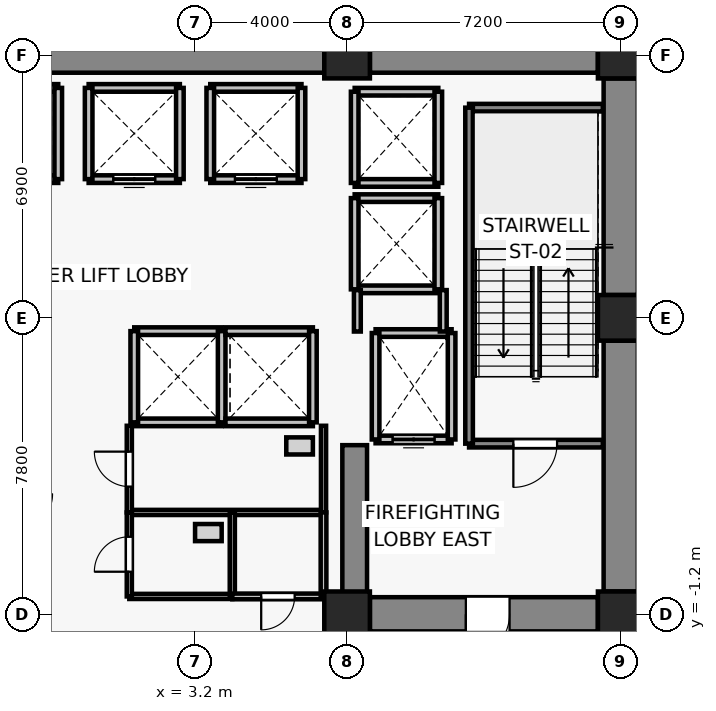
"""IFC4 building model, lengths in metres.
Left out: names, types, materials, properties, quantities, classifications, styles, units other than length and angle.
Written with IfcOpenShell. Run it as: python <this file> out.ifc"""

import sys

from ifc_helpers import new_model, si_unit, direction, frame, frame_2d, origin, origin_2d, place, context, subcontext, project, spatial, rectangle, extrude, source, transform, mapped, element, fill, save


model = new_model("IFC4")
c1 = context("Model", 3, precision=1e-05, world=origin(), true_north=direction((0.0, 1.0)))
c2 = subcontext(c1, "Body", "Model", "MODEL_VIEW")
j1 = project(units=[si_unit("LENGTHUNIT", "METRE"), si_unit("PLANEANGLEUNIT", "RADIAN")], contexts=[c1])
p1 = place(None, origin())
s1 = spatial("IfcSite", under=j1, at=p1, CompositionType="ELEMENT")
p2 = place(p1, origin())
s2 = spatial("IfcBuilding", under=s1, at=p2, CompositionType="ELEMENT")
p3 = place(p2, frame((0.0, 0.0, 9.4)))
s3 = spatial("IfcBuildingStorey", under=s2, at=p3, CompositionType="ELEMENT", Elevation=9.4)
for number, where, z_axis, x_axis in (
    (1, (7.2, -1.2, 0.0), (0.0, 0.0, 1.0), (1.0, 0.0, 0.0)),
    (2, (14.4, -1.2, 0.0), (0.0, 0.0, 1.0), (1.0, 0.0, 0.0)),
    (3, (14.4, 6.6, 0.0), (0.0, 0.0, 1.0), (1.0, 0.0, 0.0)),
    (4, (7.2, 13.5, 0.0), (0.0, 0.0, 1.0), (1.0, 0.0, 0.0)),
    (5, (14.4, 13.5, 0.0), (0.0, 0.0, 1.0), (1.0, 0.0, 0.0)),
):
    element("IfcColumn", number, at=place(p3, frame(where, z_axis=z_axis, x_axis=x_axis)), inside=s3, PredefinedType="COLUMN", context=c2, shape_type="SweptSolid", body=[
        extrude(rectangle(XDim=1.2, YDim=1.2, at=origin_2d()), origin(), (0.0, 0.0, 1.0), 4.4),
    ])
p4 = place(p3, frame((-6.6, 13.5, 0.0), z_axis=(0.0, 0.0, 1.0), x_axis=(1.0, 0.0, 0.0)))
e6 = element("IfcWall", 6, at=p4, inside=s3, PredefinedType="SHEAR", context=c2, shape_type="SweptSolid", body=[
    extrude(rectangle(XDim=13.2, YDim=0.9, at=frame_2d((6.6, 0.0))), origin(), (0.0, 0.0, 1.0), 4.1),
])
p5 = place(p3, frame((7.8, 13.5, 0.0), z_axis=(0.0, 0.0, 1.0), x_axis=(1.0, 0.0, 0.0)))
e7 = element("IfcWall", 7, at=p5, inside=s3, PredefinedType="SHEAR", context=c2, shape_type="SweptSolid", body=[
    extrude(rectangle(XDim=6.0, YDim=0.9, at=frame_2d((3.0, 0.0))), origin(), (0.0, 0.0, 1.0), 4.1),
])
p6 = place(p3, frame((14.4, -0.6, 0.0), z_axis=(0.0, 0.0, 1.0), x_axis=(0.0, 1.0, 0.0)))
e8 = element("IfcWall", 8, at=p6, inside=s3, PredefinedType="SHEAR", context=c2, shape_type="SweptSolid", body=[
    extrude(rectangle(XDim=6.6, YDim=0.9, at=frame_2d((3.3, 0.0))), origin(), (0.0, 0.0, 1.0), 4.1),
])
p7 = place(p3, frame((14.4, 7.2, 0.0), z_axis=(0.0, 0.0, 1.0), x_axis=(0.0, 1.0, 0.0)))
e9 = element("IfcWall", 9, at=p7, inside=s3, PredefinedType="SHEAR", context=c2, shape_type="SweptSolid", body=[
    extrude(rectangle(XDim=5.7, YDim=0.9, at=frame_2d((2.85, 0.0))), origin(), (0.0, 0.0, 1.0), 4.1),
])
p8 = place(p3, frame((13.8, -1.2, 0.0), z_axis=(0.0, 0.0, 1.0), x_axis=(-1.0, 0.0, 0.0)))
e10 = element("IfcWall", 10, at=p8, inside=s3, PredefinedType="SHEAR", context=c2, shape_type="SweptSolid", body=[
    extrude(rectangle(XDim=6.0, YDim=0.9, at=frame_2d((3.0, 0.0))), origin(), (0.0, 0.0, 1.0), 4.1),
])
p9 = place(p8, frame((2.325, 0.0, 0.0)))
e11 = element("IfcOpeningElement", 11, at=p9, cuts=e10, PredefinedType="OPENING", context=c2, shape_type="SweptSolid", body=[
    extrude(rectangle(XDim=1.15, YDim=2.15, at=frame_2d((0.575, 1.075))), frame((0.0, 0.46, 0.0), z_axis=(0.0, -1.0, 0.0), x_axis=(1.0, 0.0, 0.0)), (0.0, 0.0, 1.0), 0.92),
])
p10 = place(p3, frame((7.4, -0.75, 0.0), z_axis=(0.0, 0.0, 1.0), x_axis=(0.0, 1.0, 0.0)))
e12 = element("IfcWall", 12, at=p10, inside=s3, PredefinedType="SHEAR", context=c2, shape_type="SweptSolid", body=[
    extrude(rectangle(XDim=4.0, YDim=0.65, at=frame_2d((2.0, 0.0))), origin(), (0.0, 0.0, 1.0), 4.1),
])
p11 = place(p3, frame((9.95, 3.4, 0.0), z_axis=(0.0, 0.0, 1.0), x_axis=(-1.0, 0.0, 0.0)))
e13 = element("IfcWall", 13, at=p11, inside=s3, PredefinedType="SOLIDWALL", context=c2, shape_type="SweptSolid", body=[
    extrude(rectangle(XDim=2.0, YDim=0.2, at=frame_2d((1.0, 0.0))), origin(), (0.0, 0.0, 1.0), 4.1),
])
p12 = place(p11, frame((0.45, 0.0, 0.0)))
e14 = element("IfcOpeningElement", 14, at=p12, cuts=e13, PredefinedType="OPENING", context=c2, shape_type="SweptSolid", body=[
    extrude(rectangle(XDim=1.1, YDim=2.2, at=frame_2d((0.55, 1.1))), frame((0.0, 0.11, 0.0), z_axis=(0.0, -1.0, 0.0), x_axis=(1.0, 0.0, 0.0)), (0.0, 0.0, 1.0), 0.22),
])
p13 = place(p3, frame((7.95, 6.2, 0.0), z_axis=(0.0, 0.0, 1.0), x_axis=(1.0, 0.0, 0.0)))
e15 = element("IfcWall", 15, at=p13, inside=s3, PredefinedType="SOLIDWALL", context=c2, shape_type="SweptSolid", body=[
    extrude(rectangle(XDim=2.0, YDim=0.2, at=frame_2d((1.0, 0.0))), origin(), (0.0, 0.0, 1.0), 4.1),
])
for number, where, z_axis, x_axis in (
    (16, (7.95, 3.4, 0.0), (0.0, 0.0, 1.0), (0.0, 1.0, 0.0)),
    (17, (9.95, 6.2, 0.0), (0.0, 0.0, 1.0), (0.0, -1.0, 0.0)),
):
    element("IfcWall", number, at=place(p3, frame(where, z_axis=z_axis, x_axis=x_axis)), inside=s3, PredefinedType="SOLIDWALL", context=c2, shape_type="SweptSolid", body=[
        extrude(rectangle(XDim=2.8, YDim=0.2, at=frame_2d((1.4, 0.0))), origin(), (0.0, 0.0, 1.0), 4.1),
    ])
p14 = place(p3, frame((-0.4, 10.25, 0.0), z_axis=(0.0, 0.0, 1.0), x_axis=(-1.0, 0.0, 0.0)))
e18 = element("IfcWall", 18, at=p14, inside=s3, PredefinedType="SOLIDWALL", context=c2, shape_type="SweptSolid", body=[
    extrude(rectangle(XDim=2.4, YDim=0.2, at=frame_2d((1.2, 0.0))), origin(), (0.0, 0.0, 1.0), 4.1),
])
p15 = place(p14, frame((0.65, 0.0, 0.0)))
e19 = element("IfcOpeningElement", 19, at=p15, cuts=e18, PredefinedType="OPENING", context=c2, shape_type="SweptSolid", body=[
    extrude(rectangle(XDim=1.1, YDim=2.2, at=frame_2d((0.55, 1.1))), frame((0.0, 0.11, 0.0), z_axis=(0.0, -1.0, 0.0), x_axis=(1.0, 0.0, 0.0)), (0.0, 0.0, 1.0), 0.22),
])
p16 = place(p3, frame((-2.8, 12.65, 0.0), z_axis=(0.0, 0.0, 1.0), x_axis=(1.0, 0.0, 0.0)))
e20 = element("IfcWall", 20, at=p16, inside=s3, PredefinedType="SOLIDWALL", context=c2, shape_type="SweptSolid", body=[
    extrude(rectangle(XDim=2.4, YDim=0.2, at=frame_2d((1.2, 0.0))), origin(), (0.0, 0.0, 1.0), 4.1),
])
p17 = place(p3, frame((-0.4, 12.65, 0.0), z_axis=(0.0, 0.0, 1.0), x_axis=(0.0, -1.0, 0.0)))
e21 = element("IfcWall", 21, at=p17, inside=s3, PredefinedType="SOLIDWALL", context=c2, shape_type="SweptSolid", body=[
    extrude(rectangle(XDim=2.4, YDim=0.2, at=frame_2d((1.2, 0.0))), origin(), (0.0, 0.0, 1.0), 4.1),
])
p18 = place(p3, frame((2.8, 10.25, 0.0), z_axis=(0.0, 0.0, 1.0), x_axis=(-1.0, 0.0, 0.0)))
e22 = element("IfcWall", 22, at=p18, inside=s3, PredefinedType="SOLIDWALL", context=c2, shape_type="SweptSolid", body=[
    extrude(rectangle(XDim=2.4, YDim=0.2, at=frame_2d((1.2, 0.0))), origin(), (0.0, 0.0, 1.0), 4.1),
])
p19 = place(p18, frame((0.65, 0.0, 0.0)))
e23 = element("IfcOpeningElement", 23, at=p19, cuts=e22, PredefinedType="OPENING", context=c2, shape_type="SweptSolid", body=[
    extrude(rectangle(XDim=1.1, YDim=2.2, at=frame_2d((0.55, 1.1))), frame((0.0, 0.11, 0.0), z_axis=(0.0, -1.0, 0.0), x_axis=(1.0, 0.0, 0.0)), (0.0, 0.0, 1.0), 0.22),
])
p20 = place(p3, frame((0.4, 12.65, 0.0), z_axis=(0.0, 0.0, 1.0), x_axis=(1.0, 0.0, 0.0)))
e24 = element("IfcWall", 24, at=p20, inside=s3, PredefinedType="SOLIDWALL", context=c2, shape_type="SweptSolid", body=[
    extrude(rectangle(XDim=2.4, YDim=0.2, at=frame_2d((1.2, 0.0))), origin(), (0.0, 0.0, 1.0), 4.1),
])
for number, where, z_axis, x_axis in (
    (25, (0.4, 10.25, 0.0), (0.0, 0.0, 1.0), (0.0, 1.0, 0.0)),
    (26, (2.8, 12.65, 0.0), (0.0, 0.0, 1.0), (0.0, -1.0, 0.0)),
):
    element("IfcWall", number, at=place(p3, frame(where, z_axis=z_axis, x_axis=x_axis)), inside=s3, PredefinedType="SOLIDWALL", context=c2, shape_type="SweptSolid", body=[
        extrude(rectangle(XDim=2.4, YDim=0.2, at=frame_2d((1.2, 0.0))), origin(), (0.0, 0.0, 1.0), 4.1),
    ])
p21 = place(p3, frame((6.0, 10.25, 0.0), z_axis=(0.0, 0.0, 1.0), x_axis=(-1.0, 0.0, 0.0)))
e27 = element("IfcWall", 27, at=p21, inside=s3, PredefinedType="SOLIDWALL", context=c2, shape_type="SweptSolid", body=[
    extrude(rectangle(XDim=2.4, YDim=0.2, at=frame_2d((1.2, 0.0))), origin(), (0.0, 0.0, 1.0), 4.1),
])
p22 = place(p21, frame((0.65, 0.0, 0.0)))
e28 = element("IfcOpeningElement", 28, at=p22, cuts=e27, PredefinedType="OPENING", context=c2, shape_type="SweptSolid", body=[
    extrude(rectangle(XDim=1.1, YDim=2.2, at=frame_2d((0.55, 1.1))), frame((0.0, 0.11, 0.0), z_axis=(0.0, -1.0, 0.0), x_axis=(1.0, 0.0, 0.0)), (0.0, 0.0, 1.0), 0.22),
])
for number, where, z_axis, x_axis in (
    (29, (3.6, 12.65, 0.0), (0.0, 0.0, 1.0), (1.0, 0.0, 0.0)),
    (30, (3.6, 10.25, 0.0), (0.0, 0.0, 1.0), (0.0, 1.0, 0.0)),
    (31, (6.0, 12.65, 0.0), (0.0, 0.0, 1.0), (0.0, -1.0, 0.0)),
):
    element("IfcWall", number, at=place(p3, frame(where, z_axis=z_axis, x_axis=x_axis)), inside=s3, PredefinedType="SOLIDWALL", context=c2, shape_type="SweptSolid", body=[
        extrude(rectangle(XDim=2.4, YDim=0.2, at=frame_2d((1.2, 0.0))), origin(), (0.0, 0.0, 1.0), 4.1),
    ])
for number, where, z_axis, x_axis in (
    (32, (3.9, 3.85, 0.0), (0.0, 0.0, 1.0), (-1.0, 0.0, 0.0)),
    (33, (1.6, 6.25, 0.0), (0.0, 0.0, 1.0), (1.0, 0.0, 0.0)),
):
    element("IfcWall", number, at=place(p3, frame(where, z_axis=z_axis, x_axis=x_axis)), inside=s3, PredefinedType="SOLIDWALL", context=c2, shape_type="SweptSolid", body=[
        extrude(rectangle(XDim=2.3, YDim=0.2, at=frame_2d((1.15, 0.0))), origin(), (0.0, 0.0, 1.0), 4.1),
    ])
for number, where, z_axis, x_axis in (
    (34, (1.6, 3.85, 0.0), (0.0, 0.0, 1.0), (0.0, 1.0, 0.0)),
    (35, (3.9, 6.25, 0.0), (0.0, 0.0, 1.0), (0.0, -1.0, 0.0)),
):
    element("IfcWall", number, at=place(p3, frame(where, z_axis=z_axis, x_axis=x_axis)), inside=s3, PredefinedType="SOLIDWALL", context=c2, shape_type="SweptSolid", body=[
        extrude(rectangle(XDim=2.4, YDim=0.2, at=frame_2d((1.2, 0.0))), origin(), (0.0, 0.0, 1.0), 4.1),
    ])
for number, where, z_axis, x_axis in (
    (36, (6.3, 3.85, 0.0), (0.0, 0.0, 1.0), (-1.0, 0.0, 0.0)),
    (37, (4.0, 6.25, 0.0), (0.0, 0.0, 1.0), (1.0, 0.0, 0.0)),
):
    element("IfcWall", number, at=place(p3, frame(where, z_axis=z_axis, x_axis=x_axis)), inside=s3, PredefinedType="SOLIDWALL", context=c2, shape_type="SweptSolid", body=[
        extrude(rectangle(XDim=2.3, YDim=0.2, at=frame_2d((1.15, 0.0))), origin(), (0.0, 0.0, 1.0), 4.1),
    ])
p23 = place(p3, frame((6.3, 6.25, 0.0), z_axis=(0.0, 0.0, 1.0), x_axis=(0.0, -1.0, 0.0)))
e38 = element("IfcWall", 38, at=p23, inside=s3, PredefinedType="SOLIDWALL", context=c2, shape_type="SweptSolid", body=[
    extrude(rectangle(XDim=2.4, YDim=0.2, at=frame_2d((1.2, 0.0))), origin(), (0.0, 0.0, 1.0), 4.1),
])
for number, where, z_axis, x_axis in (
    (39, (9.6, 7.35, 0.0), (0.0, 0.0, 1.0), (-1.0, 0.0, 0.0)),
    (40, (7.4, 9.75, 0.0), (0.0, 0.0, 1.0), (1.0, 0.0, 0.0)),
):
    element("IfcWall", number, at=place(p3, frame(where, z_axis=z_axis, x_axis=x_axis)), inside=s3, PredefinedType="SOLIDWALL", context=c2, shape_type="SweptSolid", body=[
        extrude(rectangle(XDim=2.2, YDim=0.2, at=frame_2d((1.1, 0.0))), origin(), (0.0, 0.0, 1.0), 3.19),
    ])
p24 = place(p3, frame((7.4, 7.35, 0.0), z_axis=(0.0, 0.0, 1.0), x_axis=(0.0, 1.0, 0.0)))
e41 = element("IfcWall", 41, at=p24, inside=s3, PredefinedType="SOLIDWALL", context=c2, shape_type="SweptSolid", body=[
    extrude(rectangle(XDim=2.4, YDim=0.2, at=frame_2d((1.2, 0.0))), origin(), (0.0, 0.0, 1.0), 3.19),
])
p25 = place(p3, frame((9.6, 9.75, 0.0), z_axis=(0.0, 0.0, 1.0), x_axis=(0.0, -1.0, 0.0)))
e42 = element("IfcWall", 42, at=p25, inside=s3, PredefinedType="SOLIDWALL", context=c2, shape_type="SweptSolid", body=[
    extrude(rectangle(XDim=2.4, YDim=0.2, at=frame_2d((1.2, 0.0))), origin(), (0.0, 0.0, 1.0), 4.1),
])
for number, where, z_axis, x_axis in (
    (43, (9.6, 10.15, 0.0), (0.0, 0.0, 1.0), (-1.0, 0.0, 0.0)),
    (44, (7.4, 12.55, 0.0), (0.0, 0.0, 1.0), (1.0, 0.0, 0.0)),
):
    element("IfcWall", number, at=place(p3, frame(where, z_axis=z_axis, x_axis=x_axis)), inside=s3, PredefinedType="SOLIDWALL", context=c2, shape_type="SweptSolid", body=[
        extrude(rectangle(XDim=2.2, YDim=0.2, at=frame_2d((1.1, 0.0))), origin(), (0.0, 0.0, 1.0), 3.19),
    ])
p26 = place(p3, frame((7.4, 10.15, 0.0), z_axis=(0.0, 0.0, 1.0), x_axis=(0.0, 1.0, 0.0)))
e45 = element("IfcWall", 45, at=p26, inside=s3, PredefinedType="SOLIDWALL", context=c2, shape_type="SweptSolid", body=[
    extrude(rectangle(XDim=2.4, YDim=0.2, at=frame_2d((1.2, 0.0))), origin(), (0.0, 0.0, 1.0), 3.19),
])
p27 = place(p3, frame((9.6, 12.55, 0.0), z_axis=(0.0, 0.0, 1.0), x_axis=(0.0, -1.0, 0.0)))
e46 = element("IfcWall", 46, at=p27, inside=s3, PredefinedType="SOLIDWALL", context=c2, shape_type="SweptSolid", body=[
    extrude(rectangle(XDim=2.4, YDim=0.2, at=frame_2d((1.2, 0.0))), origin(), (0.0, 0.0, 1.0), 4.1),
])
p28 = place(p3, frame((13.93, 3.29, 0.0), z_axis=(0.0, 0.0, 1.0), x_axis=(-1.0, 0.0, 0.0)))
e47 = element("IfcWall", 47, at=p28, inside=s3, PredefinedType="SOLIDWALL", context=c2, shape_type="SweptSolid", body=[
    extrude(rectangle(XDim=3.52, YDim=0.2, at=frame_2d((1.76, 0.0))), origin(), (0.0, 0.0, 1.0), 4.1),
])
p29 = place(p28, frame((1.205, 0.0, 0.0)))
e48 = element("IfcOpeningElement", 48, at=p29, cuts=e47, PredefinedType="OPENING", context=c2, shape_type="SweptSolid", body=[
    extrude(rectangle(XDim=1.15, YDim=2.15, at=frame_2d((0.575, 1.075))), frame((0.0, 0.11, 0.0), z_axis=(0.0, -1.0, 0.0), x_axis=(1.0, 0.0, 0.0)), (0.0, 0.0, 1.0), 0.22),
])
p30 = place(p3, frame((10.41, 12.13, 0.0), z_axis=(0.0, 0.0, 1.0), x_axis=(1.0, 0.0, 0.0)))
e49 = element("IfcWall", 49, at=p30, inside=s3, PredefinedType="SOLIDWALL", context=c2, shape_type="SweptSolid", body=[
    extrude(rectangle(XDim=3.52, YDim=0.2, at=frame_2d((1.76, 0.0))), origin(), (0.0, 0.0, 1.0), 4.1),
])
p31 = place(p3, frame((10.41, 3.29, 0.0), z_axis=(0.0, 0.0, 1.0), x_axis=(0.0, 1.0, 0.0)))
e50 = element("IfcWall", 50, at=p31, inside=s3, PredefinedType="SOLIDWALL", context=c2, shape_type="SweptSolid", body=[
    extrude(rectangle(XDim=8.84, YDim=0.2, at=frame_2d((4.42, 0.0))), origin(), (0.0, 0.0, 1.0), 4.1),
])
p32 = place(p3, frame((7.47, 6.24, 0.0), z_axis=(0.0, 0.0, 1.0), x_axis=(0.0, 1.0, 0.0)))
e51 = element("IfcWall", 51, at=p32, inside=s3, PredefinedType="PARTITIONING", context=c2, shape_type="SweptSolid", body=[
    extrude(rectangle(XDim=1.09, YDim=0.18, at=frame_2d((0.545, 0.0))), origin(), (0.0, 0.0, 1.0), 3.19),
])
p33 = place(p3, frame((9.73, 7.33, 0.0), z_axis=(0.0, 0.0, 1.0), x_axis=(0.0, -1.0, 0.0)))
e52 = element("IfcWall", 52, at=p33, inside=s3, PredefinedType="PARTITIONING", context=c2, shape_type="SweptSolid", body=[
    extrude(rectangle(XDim=1.09, YDim=0.18, at=frame_2d((0.545, 0.0))), origin(), (0.0, 0.0, 1.0), 4.1),
])
p34 = place(p3, frame((6.58, 1.48, 0.0), z_axis=(0.0, 0.0, 1.0), x_axis=(-1.0, 0.0, 0.0)))
e53 = element("IfcWall", 53, at=p34, inside=s3, PredefinedType="PARTITIONING", context=c2, shape_type="SweptSolid", body=[
    extrude(rectangle(XDim=5.11, YDim=0.135, at=frame_2d((2.555, 0.0))), origin(), (0.0, 0.0, 1.0), 4.1),
])
p35 = place(p3, frame((1.47, 1.48, 0.0), z_axis=(0.0, 0.0, 1.0), x_axis=(0.0, 1.0, 0.0)))
e54 = element("IfcWall", 54, at=p35, inside=s3, PredefinedType="PARTITIONING", context=c2, shape_type="SweptSolid", body=[
    extrude(rectangle(XDim=2.28, YDim=0.135, at=frame_2d((1.14, 0.0))), origin(), (0.0, 0.0, 1.0), 3.473),
])
p36 = place(p35, frame((0.68, 0.0, 0.0)))
e55 = element("IfcOpeningElement", 55, at=p36, cuts=e54, PredefinedType="OPENING", context=c2, shape_type="SweptSolid", body=[
    extrude(rectangle(XDim=0.92, YDim=2.1, at=frame_2d((0.46, 1.05))), frame((0.0, 0.077, 0.0), z_axis=(0.0, -1.0, 0.0), x_axis=(1.0, 0.0, 0.0)), (0.0, 0.0, 1.0), 0.155),
])
p37 = place(p3, frame((6.58, 3.76, 0.0), z_axis=(0.0, 0.0, 1.0), x_axis=(0.0, -1.0, 0.0)))
e56 = element("IfcWall", 56, at=p37, inside=s3, PredefinedType="PARTITIONING", context=c2, shape_type="SweptSolid", body=[
    extrude(rectangle(XDim=2.28, YDim=0.135, at=frame_2d((1.14, 0.0))), origin(), (0.0, 0.0, 1.0), 3.473),
])
p38 = place(p3, frame((4.18, -0.73, 0.0), z_axis=(0.0, 0.0, 1.0), x_axis=(-1.0, 0.0, 0.0)))
e57 = element("IfcWall", 57, at=p38, inside=s3, PredefinedType="PARTITIONING", context=c2, shape_type="SweptSolid", body=[
    extrude(rectangle(XDim=2.71, YDim=0.135, at=frame_2d((1.355, 0.0))), origin(), (0.0, 0.0, 1.0), 4.1),
])
p39 = place(p3, frame((1.47, -0.73, 0.0), z_axis=(0.0, 0.0, 1.0), x_axis=(0.0, 1.0, 0.0)))
e58 = element("IfcWall", 58, at=p39, inside=s3, PredefinedType="PARTITIONING", context=c2, shape_type="SweptSolid", body=[
    extrude(rectangle(XDim=2.21, YDim=0.135, at=frame_2d((1.105, 0.0))), origin(), (0.0, 0.0, 1.0), 4.1),
])
p40 = place(p39, frame((0.65, 0.0, 0.0)))
e59 = element("IfcOpeningElement", 59, at=p40, cuts=e58, PredefinedType="OPENING", context=c2, shape_type="SweptSolid", body=[
    extrude(rectangle(XDim=0.92, YDim=2.1, at=frame_2d((0.46, 1.05))), frame((0.0, 0.077, 0.0), z_axis=(0.0, -1.0, 0.0), x_axis=(1.0, 0.0, 0.0)), (0.0, 0.0, 1.0), 0.155),
])
p41 = place(p3, frame((4.18, 1.48, 0.0), z_axis=(0.0, 0.0, 1.0), x_axis=(0.0, -1.0, 0.0)))
e60 = element("IfcWall", 60, at=p41, inside=s3, PredefinedType="PARTITIONING", context=c2, shape_type="SweptSolid", body=[
    extrude(rectangle(XDim=2.21, YDim=0.135, at=frame_2d((1.105, 0.0))), origin(), (0.0, 0.0, 1.0), 4.1),
])
p42 = place(p3, frame((6.58, -0.73, 0.0), z_axis=(0.0, 0.0, 1.0), x_axis=(-1.0, 0.0, 0.0)))
e61 = element("IfcWall", 61, at=p42, inside=s3, PredefinedType="PARTITIONING", context=c2, shape_type="SweptSolid", body=[
    extrude(rectangle(XDim=2.4, YDim=0.15, at=frame_2d((1.2, 0.0))), origin(), (0.0, 0.0, 1.0), 4.1),
])
p43 = place(p42, frame((0.76, 0.0, 0.0)))
e62 = element("IfcOpeningElement", 62, at=p43, cuts=e61, PredefinedType="OPENING", context=c2, shape_type="SweptSolid", body=[
    extrude(rectangle(XDim=0.88, YDim=2.1, at=frame_2d((0.44, 1.05))), frame((0.0, 0.085, 0.0), z_axis=(0.0, -1.0, 0.0), x_axis=(1.0, 0.0, 0.0)), (0.0, 0.0, 1.0), 0.17),
])
p44 = place(p3, frame((6.58, 1.48, 0.0), z_axis=(0.0, 0.0, 1.0), x_axis=(0.0, -1.0, 0.0)))
e63 = element("IfcWall", 63, at=p44, inside=s3, PredefinedType="PARTITIONING", context=c2, shape_type="SweptSolid", body=[
    extrude(rectangle(XDim=2.21, YDim=0.15, at=frame_2d((1.105, 0.0))), origin(), (0.0, 0.0, 1.0), 4.1),
])
m1 = source(origin(), c2, "Body", "SweptSolid", [
    extrude(rectangle(XDim=1.1, YDim=2.2, at=frame_2d((0.55, 1.1))), frame((0.0, 0.025, 0.0), z_axis=(0.0, -1.0, 0.0), x_axis=(1.0, 0.0, 0.0)), (0.0, 0.0, 1.0), 0.05),
])
p45 = place(p12, origin())
e64 = element("IfcDoor", 64, at=p45, inside=s3, OperationType="DOUBLE_DOOR_SLIDING", PredefinedType="DOOR", context=c2, shape_type="MappedRepresentation", body=[
    mapped(m1, transform((0.0, 0.0, 0.0), x_axis=(1.0, 0.0, 0.0), y_axis=(0.0, 1.0, 0.0), z_axis=(0.0, 0.0, 1.0), scale=1.0)),
])
fill(e14, e64)
p46 = place(p19, origin())
e65 = element("IfcDoor", 65, at=p46, inside=s3, OperationType="DOUBLE_DOOR_SLIDING", PredefinedType="DOOR", context=c2, shape_type="MappedRepresentation", body=[
    mapped(m1, transform((0.0, 0.0, 0.0), x_axis=(1.0, 0.0, 0.0), y_axis=(0.0, 1.0, 0.0), z_axis=(0.0, 0.0, 1.0), scale=1.0)),
])
fill(e23, e65)
p47 = place(p22, origin())
e66 = element("IfcDoor", 66, at=p47, inside=s3, OperationType="DOUBLE_DOOR_SLIDING", PredefinedType="DOOR", context=c2, shape_type="MappedRepresentation", body=[
    mapped(m1, transform((0.0, 0.0, 0.0), x_axis=(1.0, 0.0, 0.0), y_axis=(0.0, 1.0, 0.0), z_axis=(0.0, 0.0, 1.0), scale=1.0)),
])
fill(e28, e66)
m2 = source(origin(), c2, "Body", "SweptSolid", [
    extrude(rectangle(XDim=1.15, YDim=2.15, at=frame_2d((0.575, 1.075))), frame((0.0, 0.025, 0.0), z_axis=(0.0, -1.0, 0.0), x_axis=(1.0, 0.0, 0.0)), (0.0, 0.0, 1.0), 0.05),
])
p48 = place(p29, origin())
e67 = element("IfcDoor", 67, at=p48, inside=s3, OperationType="SINGLE_SWING_RIGHT", PredefinedType="DOOR", context=c2, shape_type="MappedRepresentation", body=[
    mapped(m2, transform((0.0, 0.0, 0.0), x_axis=(1.0, 0.0, 0.0), y_axis=(0.0, 1.0, 0.0), z_axis=(0.0, 0.0, 1.0), scale=1.0)),
])
fill(e48, e67)
p49 = place(p9, origin())
e68 = element("IfcDoor", 68, at=p49, inside=s3, OperationType="SINGLE_SWING_RIGHT", PredefinedType="DOOR", context=c2, shape_type="MappedRepresentation", body=[
    mapped(m2, transform((0.0, 0.0, 0.0), x_axis=(1.0, 0.0, 0.0), y_axis=(0.0, 1.0, 0.0), z_axis=(0.0, 0.0, 1.0), scale=1.0)),
])
fill(e11, e68)
m3 = source(origin(), c2, "Body", "SweptSolid", [
    extrude(rectangle(XDim=0.92, YDim=2.1, at=frame_2d((0.46, 1.05))), frame((0.0, 0.025, 0.0), z_axis=(0.0, -1.0, 0.0), x_axis=(1.0, 0.0, 0.0)), (0.0, 0.0, 1.0), 0.05),
])
p50 = place(p36, origin())
e69 = element("IfcDoor", 69, at=p50, inside=s3, OperationType="SINGLE_SWING_RIGHT", PredefinedType="DOOR", context=c2, shape_type="MappedRepresentation", body=[
    mapped(m3, transform((0.0, 0.0, 0.0), x_axis=(1.0, 0.0, 0.0), y_axis=(0.0, 1.0, 0.0), z_axis=(0.0, 0.0, 1.0), scale=1.0)),
])
fill(e55, e69)
p51 = place(p40, origin())
e70 = element("IfcDoor", 70, at=p51, inside=s3, OperationType="SINGLE_SWING_LEFT", PredefinedType="DOOR", context=c2, shape_type="MappedRepresentation", body=[
    mapped(m3, transform((0.0, 0.0, 0.0), x_axis=(1.0, 0.0, 0.0), y_axis=(0.0, 1.0, 0.0), z_axis=(0.0, 0.0, 1.0), scale=1.0)),
])
fill(e59, e70)
m4 = source(origin(), c2, "Body", "SweptSolid", [
    extrude(rectangle(XDim=0.88, YDim=2.1, at=frame_2d((0.44, 1.05))), frame((0.0, 0.025, 0.0), z_axis=(0.0, -1.0, 0.0), x_axis=(1.0, 0.0, 0.0)), (0.0, 0.0, 1.0), 0.05),
])
p52 = place(p43, origin())
e71 = element("IfcDoor", 71, at=p52, inside=s3, OperationType="SINGLE_SWING_RIGHT", PredefinedType="DOOR", context=c2, shape_type="MappedRepresentation", body=[
    mapped(m4, transform((0.0, 0.0, 0.0), x_axis=(1.0, 0.0, 0.0), y_axis=(0.0, 1.0, 0.0), z_axis=(0.0, 0.0, 1.0), scale=1.0)),
])
fill(e62, e71)
save(model, sys.argv[1])
